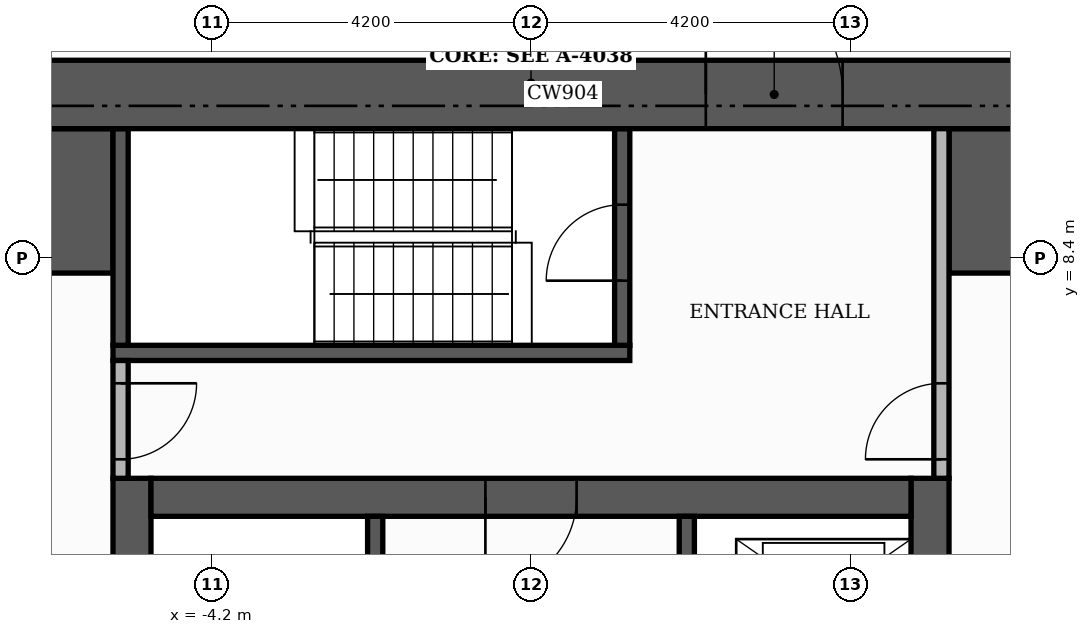
"""IFC4 building model, lengths in metres.
Left out: names, types, materials, properties, quantities, classifications, styles, units other than length and angle.
Written with IfcOpenShell. Run it as: python <this file> out.ifc"""

import sys

from ifc_helpers import new_model, si_unit, direction, frame, frame_2d, origin, place, context, subcontext, project, spatial, rectangle, extrude, element, fill, save


model = new_model("IFC4")
c1 = context("Model", 3, precision=1e-05, world=origin(), true_north=direction((0.0, 1.0)))
c2 = subcontext(c1, "Body", "Model", "MODEL_VIEW")
j1 = project(units=[si_unit("LENGTHUNIT", "METRE"), si_unit("PLANEANGLEUNIT", "RADIAN")], contexts=[c1])
p1 = place(None, origin())
s1 = spatial("IfcSite", under=j1, at=p1, CompositionType="ELEMENT")
p2 = place(p1, origin())
s2 = spatial("IfcBuilding", under=s1, at=p2, CompositionType="ELEMENT")
p3 = place(p2, frame((0.0, 0.0, 227.4)))
s3 = spatial("IfcBuildingStorey", under=s2, at=p3, CompositionType="ELEMENT", Elevation=227.4)
for number, where, z_axis, x_axis in (
    (1, (-5.25, -5.0, 0.0), (0.0, 0.0, 1.0), (0.0, 1.0, 0.0)),
    (2, (5.25, -5.0, 0.0), (0.0, 0.0, 1.0), (0.0, 1.0, 0.0)),
):
    element("IfcWall", number, at=place(p3, frame(where, z_axis=z_axis, x_axis=x_axis)), inside=s3, PredefinedType="SHEAR", context=c2, shape_type="SweptSolid", body=[
        extrude(rectangle(XDim=10.5, YDim=0.5, at=frame_2d((5.25, 0.0))), origin(), (0.0, 0.0, 1.0), 3.48),
    ])
p4 = place(p3, frame((-5.0, 5.25, 0.0), z_axis=(0.0, 0.0, 1.0), x_axis=(1.0, 0.0, 0.0)))
e3 = element("IfcWall", 3, at=p4, inside=s3, PredefinedType="SHEAR", context=c2, shape_type="SweptSolid", body=[
    extrude(rectangle(XDim=10.0, YDim=0.5, at=frame_2d((5.0, 0.0))), origin(), (0.0, 0.0, 1.0), 3.48),
])
p5 = place(p4, frame((4.4, 0.0, 0.0)))
e4 = element("IfcOpeningElement", 4, at=p5, cuts=e3, PredefinedType="OPENING", context=c2, shape_type="SweptSolid", body=[
    extrude(rectangle(XDim=1.2, YDim=2.1, at=frame_2d((0.6, 1.05))), frame((0.0, 0.26, 0.0), z_axis=(0.0, -1.0, 0.0), x_axis=(1.0, 0.0, 0.0)), (0.0, 0.0, 1.0), 0.52),
])
for number, where, z_axis, x_axis in (
    (5, (-10.1, 9.15, 0.0), (0.0, 0.0, 1.0), (1.0, 0.0, 0.0)),
    (6, (5.5, 9.15, 0.0), (0.0, 0.0, 1.0), (1.0, 0.0, 0.0)),
):
    element("IfcWall", number, at=place(p3, frame(where, z_axis=z_axis, x_axis=x_axis)), inside=s3, PredefinedType="SHEAR", context=c2, shape_type="SweptSolid", body=[
        extrude(rectangle(XDim=4.6, YDim=1.9, at=frame_2d((2.3, 0.0))), origin(), (0.0, 0.0, 1.0), 3.48),
    ])
p6 = place(p3, frame((-2.05, -1.4, 0.0), z_axis=(0.0, 0.0, 1.0), x_axis=(0.0, 1.0, 0.0)))
e7 = element("IfcWall", 7, at=p6, inside=s3, PredefinedType="SHEAR", context=c2, shape_type="SweptSolid", body=[
    extrude(rectangle(XDim=6.4, YDim=0.2, at=frame_2d((3.2, 0.0))), origin(), (0.0, 0.0, 1.0), 3.48),
])
p7 = place(p6, frame((0.15, 0.0, 0.0)))
e8 = element("IfcOpeningElement", 8, at=p7, cuts=e7, PredefinedType="OPENING", context=c2, shape_type="SweptSolid", body=[
    extrude(rectangle(XDim=1.0, YDim=2.1, at=frame_2d((0.5, 1.05))), frame((0.0, 0.11, 0.0), z_axis=(0.0, -1.0, 0.0), x_axis=(1.0, 0.0, 0.0)), (0.0, 0.0, 1.0), 0.22),
])
p8 = place(p3, frame((-5.5, 7.15, 0.0), z_axis=(0.0, 0.0, 1.0), x_axis=(1.0, 0.0, 0.0)))
e9 = element("IfcWall", 9, at=p8, inside=s3, PredefinedType="SHEAR", context=c2, shape_type="SweptSolid", body=[
    extrude(rectangle(XDim=6.8, YDim=0.2, at=frame_2d((3.4, 0.0))), origin(), (0.0, 0.0, 1.0), 3.48),
])
p9 = place(p3, frame((-5.4, 7.25, 0.0), z_axis=(0.0, 0.0, 1.0), x_axis=(0.0, 1.0, 0.0)))
e10 = element("IfcWall", 10, at=p9, inside=s3, PredefinedType="SHEAR", context=c2, shape_type="SweptSolid", body=[
    extrude(rectangle(XDim=2.85, YDim=0.2, at=frame_2d((1.425, 0.0))), origin(), (0.0, 0.0, 1.0), 3.48),
])
p10 = place(p3, frame((1.2, 7.25, 0.0), z_axis=(0.0, 0.0, 1.0), x_axis=(0.0, 1.0, 0.0)))
e11 = element("IfcWall", 11, at=p10, inside=s3, PredefinedType="SHEAR", context=c2, shape_type="SweptSolid", body=[
    extrude(rectangle(XDim=2.85, YDim=0.2, at=frame_2d((1.425, 0.0))), origin(), (0.0, 0.0, 1.0), 3.48),
])
p11 = place(p10, frame((0.85, 0.0, 0.0)))
e12 = element("IfcOpeningElement", 12, at=p11, cuts=e11, PredefinedType="OPENING", context=c2, shape_type="SweptSolid", body=[
    extrude(rectangle(XDim=1.0, YDim=2.1, at=frame_2d((0.5, 1.05))), frame((0.0, 0.11, 0.0), z_axis=(0.0, -1.0, 0.0), x_axis=(1.0, 0.0, 0.0)), (0.0, 0.0, 1.0), 0.22),
])
p12 = place(p3, frame((2.05, 1.6, 0.0), z_axis=(0.0, 0.0, 1.0), x_axis=(0.0, 1.0, 0.0)))
e13 = element("IfcWall", 13, at=p12, inside=s3, PredefinedType="SHEAR", context=c2, shape_type="SweptSolid", body=[
    extrude(rectangle(XDim=3.4, YDim=0.2, at=frame_2d((1.7, 0.0))), origin(), (0.0, 0.0, 1.0), 3.48),
])
p13 = place(p12, frame((1.75, 0.0, 0.0)))
e14 = element("IfcOpeningElement", 14, at=p13, cuts=e13, PredefinedType="OPENING", context=c2, shape_type="SweptSolid", body=[
    extrude(rectangle(XDim=1.1, YDim=2.1, at=frame_2d((0.55, 1.05))), frame((0.0, 0.11, 0.0), z_axis=(0.0, -1.0, 0.0), x_axis=(1.0, 0.0, 0.0)), (0.0, 0.0, 1.0), 0.22),
])
p14 = place(p12, frame((0.15, 0.0, 0.0)))
e15 = element("IfcOpeningElement", 15, at=p14, cuts=e13, PredefinedType="OPENING", context=c2, shape_type="SweptSolid", body=[
    extrude(rectangle(XDim=0.8, YDim=2.1, at=frame_2d((0.4, 1.05))), frame((0.0, 0.11, 0.0), z_axis=(0.0, -1.0, 0.0), x_axis=(1.0, 0.0, 0.0)), (0.0, 0.0, 1.0), 0.22),
])
p15 = place(p3, frame((-11.0, 10.55, 0.0), z_axis=(0.0, 0.0, 1.0), x_axis=(1.0, 0.0, 0.0)))
e16 = element("IfcWall", 16, at=p15, inside=s3, PredefinedType="SHEAR", context=c2, shape_type="SweptSolid", body=[
    extrude(rectangle(XDim=22.0, YDim=0.9, at=frame_2d((11.0, 0.0))), origin(), (0.0, 0.0, 1.0), 3.48),
])
p16 = place(p15, frame((13.3, 0.0, 0.0)))
e17 = element("IfcOpeningElement", 17, at=p16, cuts=e16, PredefinedType="OPENING", context=c2, shape_type="SweptSolid", body=[
    extrude(rectangle(XDim=1.8, YDim=2.2, at=frame_2d((0.9, 1.1))), frame((0.0, 0.46, 0.0), z_axis=(0.0, -1.0, 0.0), x_axis=(1.0, 0.0, 0.0)), (0.0, 0.0, 1.0), 0.92),
])
p17 = place(p3, frame((-5.4, 5.5, 0.0), z_axis=(0.0, 0.0, 1.0), x_axis=(0.0, 1.0, 0.0)))
e18 = element("IfcWall", 18, at=p17, inside=s3, PredefinedType="PARTITIONING", context=c2, shape_type="SweptSolid", body=[
    extrude(rectangle(XDim=1.55, YDim=0.2, at=frame_2d((0.775, 0.0))), origin(), (0.0, 0.0, 1.0), 3.48),
])
p18 = place(p17, frame((0.25, 0.0, 0.0)))
e19 = element("IfcOpeningElement", 19, at=p18, cuts=e18, PredefinedType="OPENING", context=c2, shape_type="SweptSolid", body=[
    extrude(rectangle(XDim=1.0, YDim=2.1, at=frame_2d((0.5, 1.05))), frame((0.0, 0.11, 0.0), z_axis=(0.0, -1.0, 0.0), x_axis=(1.0, 0.0, 0.0)), (0.0, 0.0, 1.0), 0.22),
])
p19 = place(p3, frame((5.4, 5.5, 0.0), z_axis=(0.0, 0.0, 1.0), x_axis=(0.0, 1.0, 0.0)))
e20 = element("IfcWall", 20, at=p19, inside=s3, PredefinedType="PARTITIONING", context=c2, shape_type="SweptSolid", body=[
    extrude(rectangle(XDim=4.6, YDim=0.2, at=frame_2d((2.3, 0.0))), origin(), (0.0, 0.0, 1.0), 3.48),
])
p20 = place(p19, frame((0.25, 0.0, 0.0)))
e21 = element("IfcOpeningElement", 21, at=p20, cuts=e20, PredefinedType="OPENING", context=c2, shape_type="SweptSolid", body=[
    extrude(rectangle(XDim=1.0, YDim=2.1, at=frame_2d((0.5, 1.05))), frame((0.0, 0.11, 0.0), z_axis=(0.0, -1.0, 0.0), x_axis=(1.0, 0.0, 0.0)), (0.0, 0.0, 1.0), 0.22),
])
p21 = place(p5, frame((1.2, 0.0, 0.0), z_axis=(0.0, 0.0, 1.0), x_axis=(-1.0, 0.0, 0.0)))
e22 = element("IfcDoor", 22, at=p21, inside=s3, OperationType="SINGLE_SWING_LEFT", PredefinedType="DOOR", context=c2, shape_type="SweptSolid", body=[
    extrude(rectangle(XDim=1.2, YDim=2.1, at=frame_2d((0.6, 1.05))), frame((0.0, 0.025, 0.0), z_axis=(0.0, -1.0, 0.0), x_axis=(1.0, 0.0, 0.0)), (0.0, 0.0, 1.0), 0.05),
])
fill(e4, e22)
p22 = place(p11, origin())
e23 = element("IfcDoor", 23, at=p22, inside=s3, OperationType="SINGLE_SWING_LEFT", PredefinedType="DOOR", context=c2, shape_type="SweptSolid", body=[
    extrude(rectangle(XDim=1.0, YDim=2.1, at=frame_2d((0.5, 1.05))), frame((0.0, 0.025, 0.0), z_axis=(0.0, -1.0, 0.0), x_axis=(1.0, 0.0, 0.0)), (0.0, 0.0, 1.0), 0.05),
])
fill(e12, e23)
p23 = place(p18, frame((1.0, 0.0, 0.0), z_axis=(0.0, 0.0, 1.0), x_axis=(-1.0, 0.0, 0.0)))
e24 = element("IfcDoor", 24, at=p23, inside=s3, OperationType="SINGLE_SWING_RIGHT", PredefinedType="DOOR", context=c2, shape_type="SweptSolid", body=[
    extrude(rectangle(XDim=1.0, YDim=2.1, at=frame_2d((0.5, 1.05))), frame((0.0, 0.025, 0.0), z_axis=(0.0, -1.0, 0.0), x_axis=(1.0, 0.0, 0.0)), (0.0, 0.0, 1.0), 0.05),
])
fill(e19, e24)
p24 = place(p20, origin())
e25 = element("IfcDoor", 25, at=p24, inside=s3, OperationType="SINGLE_SWING_LEFT", PredefinedType="DOOR", context=c2, shape_type="SweptSolid", body=[
    extrude(rectangle(XDim=1.0, YDim=2.1, at=frame_2d((0.5, 1.05))), frame((0.0, 0.025, 0.0), z_axis=(0.0, -1.0, 0.0), x_axis=(1.0, 0.0, 0.0)), (0.0, 0.0, 1.0), 0.05),
])
fill(e21, e25)
p25 = place(p16, origin())
e26 = element("IfcDoor", 26, at=p25, inside=s3, OperationType="DOUBLE_DOOR_SINGLE_SWING", PredefinedType="DOOR", context=c2, shape_type="SweptSolid", body=[
    extrude(rectangle(XDim=1.8, YDim=2.2, at=frame_2d((0.9, 1.1))), frame((0.0, 0.025, 0.0), z_axis=(0.0, -1.0, 0.0), x_axis=(1.0, 0.0, 0.0)), (0.0, 0.0, 1.0), 0.05),
])
fill(e17, e26)
save(model, sys.argv[1])
